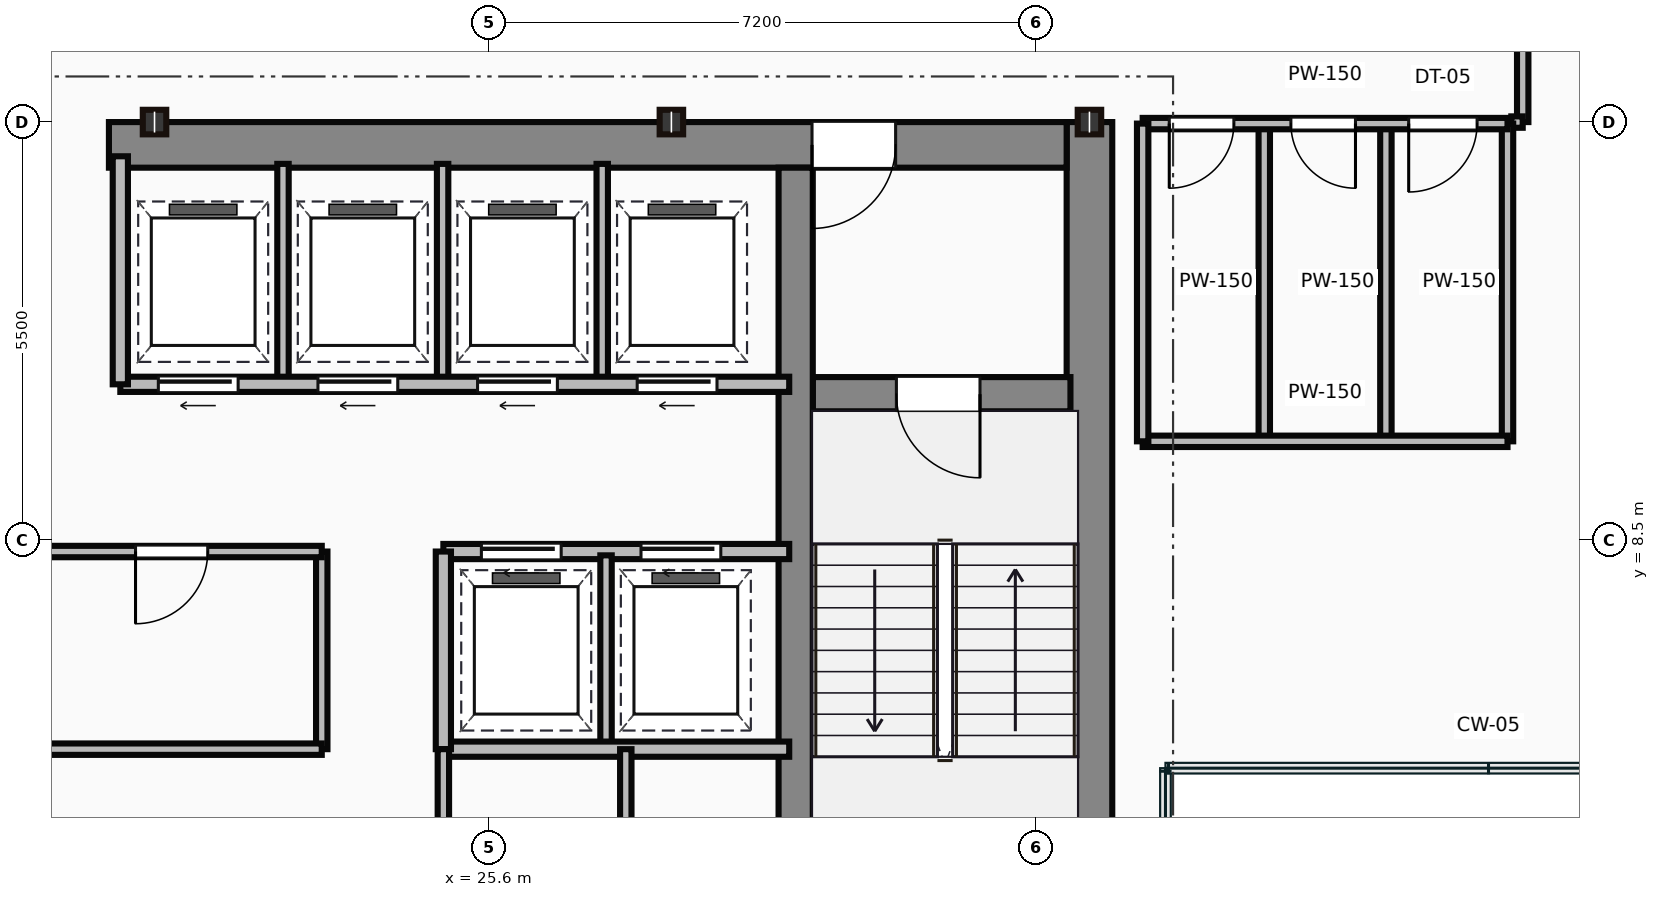
"""IFC4 building model, lengths in metres.
Left out: names, types, materials, properties, quantities, classifications, styles, units other than length and angle.
Written with IfcOpenShell. Run it as: python <this file> out.ifc"""

import sys

from ifc_helpers import new_model, si_unit, direction, frame, frame_2d, origin, origin_2d, place, context, subcontext, project, spatial, rectangle, i_section, extrude, source, transform, mapped, element, fill, save


model = new_model("IFC4")
c1 = context("Model", 3, precision=1e-05, world=origin(), true_north=direction((0.0, 1.0)))
c2 = subcontext(c1, "Body", "Model", "MODEL_VIEW")
j1 = project(units=[si_unit("LENGTHUNIT", "METRE"), si_unit("PLANEANGLEUNIT", "RADIAN")], contexts=[c1])
p1 = place(None, origin())
s1 = spatial("IfcSite", under=j1, at=p1, CompositionType="ELEMENT")
p2 = place(p1, origin())
s2 = spatial("IfcBuilding", under=s1, at=p2, CompositionType="ELEMENT")
p3 = place(p2, frame((0.0, 0.0, 284.35)))
s3 = spatial("IfcBuildingStorey", under=s2, at=p3, CompositionType="ELEMENT", Elevation=284.35)
m1 = source(origin(), c2, "Body", "SweptSolid", [
    extrude(rectangle(XDim=13.1, YDim=0.6, at=frame_2d((6.55, 0.0))), origin(), (0.0, 0.0, 1.0), 3.65),
])
p4 = place(p3, frame((33.5, 0.9, 0.0), z_axis=(0.0, 0.0, 1.0), x_axis=(0.0, 1.0, 0.0)))
e1 = element("IfcWall", 1, at=p4, inside=s3, PredefinedType="SHEAR", context=c2, shape_type="MappedRepresentation", body=[
    mapped(m1, transform((0.0, 0.0, 0.0))),
])
m2 = source(origin(), c2, "Body", "SweptSolid", [
    extrude(rectangle(XDim=12.6, YDim=0.6, at=frame_2d((6.3, 0.0))), origin(), (0.0, 0.0, 1.0), 3.65),
])
p5 = place(p3, frame((20.6, 13.7, 0.0), z_axis=(0.0, 0.0, 1.0), x_axis=(1.0, 0.0, 0.0)))
e2 = element("IfcWall", 2, at=p5, inside=s3, PredefinedType="SHEAR", context=c2, shape_type="MappedRepresentation", body=[
    mapped(m2, transform((0.0, 0.0, 0.0))),
])
p6 = place(p5, frame((9.25, 0.0, 0.0)))
e3 = element("IfcOpeningElement", 3, at=p6, cuts=e2, PredefinedType="OPENING", context=c2, shape_type="SweptSolid", body=[
    extrude(rectangle(XDim=1.1, YDim=2.15, at=frame_2d((0.55, 1.075))), frame((0.0, 0.31, 0.0), z_axis=(0.0, -1.0, 0.0), x_axis=(1.0, 0.0, 0.0)), (0.0, 0.0, 1.0), 0.62),
])
m3 = source(origin(), c2, "Body", "SweptSolid", [
    extrude(rectangle(XDim=12.5, YDim=0.45, at=frame_2d((6.25, 0.0))), origin(), (0.0, 0.0, 1.0), 3.65),
])
p7 = place(p3, frame((29.635, 0.9, 0.0), z_axis=(0.0, 0.0, 1.0), x_axis=(0.0, 1.0, 0.0)))
e4 = element("IfcWall", 4, at=p7, inside=s3, PredefinedType="SHEAR", context=c2, shape_type="MappedRepresentation", body=[
    mapped(m3, transform((0.0, 0.0, 0.0))),
])
m4 = source(origin(), c2, "Body", "SweptSolid", [
    extrude(rectangle(XDim=3.39, YDim=0.45, at=frame_2d((1.695, 0.0))), origin(), (0.0, 0.0, 1.0), 3.65),
])
p8 = place(p3, frame((29.86, 10.42, 0.0), z_axis=(0.0, 0.0, 1.0), x_axis=(1.0, 0.0, 0.0)))
e5 = element("IfcWall", 5, at=p8, inside=s3, PredefinedType="SHEAR", context=c2, shape_type="MappedRepresentation", body=[
    mapped(m4, transform((0.0, 0.0, 0.0))),
])
p9 = place(p8, frame((1.1, 0.0, 0.0)))
e6 = element("IfcOpeningElement", 6, at=p9, cuts=e5, PredefinedType="OPENING", context=c2, shape_type="SweptSolid", body=[
    extrude(rectangle(XDim=1.1, YDim=2.15, at=frame_2d((0.55, 1.075))), frame((0.0, 0.235, 0.0), z_axis=(0.0, -1.0, 0.0), x_axis=(1.0, 0.0, 0.0)), (0.0, 0.0, 1.0), 0.47),
])
m5 = source(origin(), c2, "Body", "SweptSolid", [
    extrude(i_section(OverallWidth=0.309, OverallDepth=0.323, WebThickness=0.014, FlangeThickness=0.023, at=origin_2d()), origin(), (0.0, 0.0, 1.0), 3.65),
])
for number, where, z_axis, x_axis in (
    (7, (21.2, 14.0, 0.0), (0.0, 0.0, 1.0), (1.0, 0.0, 0.0)),
    (8, (28.0, 14.0, 0.0), (0.0, 0.0, 1.0), (1.0, 0.0, 0.0)),
    (9, (33.5, 14.0, 0.0), (0.0, 0.0, 1.0), (1.0, 0.0, 0.0)),
):
    element("IfcColumn", number, at=place(p3, frame(where, z_axis=z_axis, x_axis=x_axis)), inside=s3, PredefinedType="COLUMN", context=c2, shape_type="MappedRepresentation", body=[
        mapped(m5, transform((0.0, 0.0, 0.0))),
    ])
m6 = source(origin(), c2, "Body", "SweptSolid", [
    extrude(rectangle(XDim=11.85, YDim=0.15, at=frame_2d((5.925, 0.0))), origin(), (0.0, 0.0, 1.0), 3.4),
])
p10 = place(p3, frame((11.55, 5.75, 0.0), z_axis=(0.0, 0.0, 1.0), x_axis=(1.0, 0.0, 0.0)))
e10 = element("IfcWall", 10, at=p10, inside=s3, PredefinedType="PARTITIONING", context=c2, shape_type="MappedRepresentation", body=[
    mapped(m6, transform((0.0, 0.0, 0.0))),
])
p11 = place(p3, frame((11.55, 8.35, 0.0), z_axis=(0.0, 0.0, 1.0), x_axis=(1.0, 0.0, 0.0)))
e11 = element("IfcWall", 11, at=p11, inside=s3, PredefinedType="PARTITIONING", context=c2, shape_type="MappedRepresentation", body=[
    mapped(m6, transform((0.0, 0.0, 0.0))),
])
p12 = place(p11, frame((1.1, 0.0, 0.0)))
e12 = element("IfcOpeningElement", 12, at=p12, cuts=e11, PredefinedType="OPENING", context=c2, shape_type="SweptSolid", body=[
    extrude(rectangle(XDim=0.95, YDim=2.15, at=frame_2d((0.475, 1.075))), frame((0.0, 0.085, 0.0), z_axis=(0.0, -1.0, 0.0), x_axis=(1.0, 0.0, 0.0)), (0.0, 0.0, 1.0), 0.17),
])
p13 = place(p11, frame((9.4, 0.0, 0.0)))
e13 = element("IfcOpeningElement", 13, at=p13, cuts=e11, PredefinedType="OPENING", context=c2, shape_type="SweptSolid", body=[
    extrude(rectangle(XDim=0.95, YDim=2.15, at=frame_2d((0.475, 1.075))), frame((0.0, 0.085, 0.0), z_axis=(0.0, -1.0, 0.0), x_axis=(1.0, 0.0, 0.0)), (0.0, 0.0, 1.0), 0.17),
])
m7 = source(origin(), c2, "Body", "SweptSolid", [
    extrude(rectangle(XDim=2.6, YDim=0.15, at=frame_2d((1.3, 0.0))), origin(), (0.0, 0.0, 1.0), 3.4),
])
p14 = place(p3, frame((23.4, 5.75, 0.0), z_axis=(0.0, 0.0, 1.0), x_axis=(0.0, 1.0, 0.0)))
e14 = element("IfcWall", 14, at=p14, inside=s3, PredefinedType="PARTITIONING", context=c2, shape_type="MappedRepresentation", body=[
    mapped(m7, transform((0.0, 0.0, 0.0))),
])
m8 = source(origin(), c2, "Body", "SweptSolid", [
    extrude(rectangle(XDim=8.8, YDim=0.2, at=frame_2d((4.4, 0.0))), origin(), (0.0, 0.0, 1.0), 3.4),
])
p15 = place(p3, frame((20.75, 10.55, 0.0), z_axis=(0.0, 0.0, 1.0), x_axis=(1.0, 0.0, 0.0)))
e15 = element("IfcWall", 15, at=p15, inside=s3, PredefinedType="PARTITIONING", context=c2, shape_type="MappedRepresentation", body=[
    mapped(m8, transform((0.0, 0.0, 0.0))),
])
p16 = place(p15, frame((0.5, 0.0, 0.0)))
e16 = element("IfcOpeningElement", 16, at=p16, cuts=e15, PredefinedType="OPENING", context=c2, shape_type="SweptSolid", body=[
    extrude(rectangle(XDim=1.05, YDim=2.15, at=frame_2d((0.525, 1.075))), frame((0.0, 0.11, 0.0), z_axis=(0.0, -1.0, 0.0), x_axis=(1.0, 0.0, 0.0)), (0.0, 0.0, 1.0), 0.22),
])
p17 = place(p15, frame((2.6, 0.0, 0.0)))
e17 = element("IfcOpeningElement", 17, at=p17, cuts=e15, PredefinedType="OPENING", context=c2, shape_type="SweptSolid", body=[
    extrude(rectangle(XDim=1.05, YDim=2.15, at=frame_2d((0.525, 1.075))), frame((0.0, 0.11, 0.0), z_axis=(0.0, -1.0, 0.0), x_axis=(1.0, 0.0, 0.0)), (0.0, 0.0, 1.0), 0.22),
])
p18 = place(p15, frame((4.7, 0.0, 0.0)))
e18 = element("IfcOpeningElement", 18, at=p18, cuts=e15, PredefinedType="OPENING", context=c2, shape_type="SweptSolid", body=[
    extrude(rectangle(XDim=1.05, YDim=2.15, at=frame_2d((0.525, 1.075))), frame((0.0, 0.11, 0.0), z_axis=(0.0, -1.0, 0.0), x_axis=(1.0, 0.0, 0.0)), (0.0, 0.0, 1.0), 0.22),
])
p19 = place(p15, frame((6.8, 0.0, 0.0)))
e19 = element("IfcOpeningElement", 19, at=p19, cuts=e15, PredefinedType="OPENING", context=c2, shape_type="SweptSolid", body=[
    extrude(rectangle(XDim=1.05, YDim=2.15, at=frame_2d((0.525, 1.075))), frame((0.0, 0.11, 0.0), z_axis=(0.0, -1.0, 0.0), x_axis=(1.0, 0.0, 0.0)), (0.0, 0.0, 1.0), 0.22),
])
m9 = source(origin(), c2, "Body", "SweptSolid", [
    extrude(rectangle(XDim=3.0, YDim=0.2, at=frame_2d((1.5, 0.0))), origin(), (0.0, 0.0, 1.0), 3.4),
])
p20 = place(p3, frame((20.75, 10.55, 0.0), z_axis=(0.0, 0.0, 1.0), x_axis=(0.0, 1.0, 0.0)))
e20 = element("IfcWall", 20, at=p20, inside=s3, PredefinedType="PARTITIONING", context=c2, shape_type="MappedRepresentation", body=[
    mapped(m9, transform((0.0, 0.0, 0.0))),
])
m10 = source(origin(), c2, "Body", "SweptSolid", [
    extrude(rectangle(XDim=2.85, YDim=0.15, at=frame_2d((1.425, 0.0))), origin(), (0.0, 0.0, 1.0), 3.4),
])
for number, where, z_axis, x_axis in (
    (21, (22.89, 10.6, 0.0), (0.0, 0.0, 1.0), (0.0, 1.0, 0.0)),
    (22, (24.99, 10.6, 0.0), (0.0, 0.0, 1.0), (0.0, 1.0, 0.0)),
    (23, (27.09, 10.6, 0.0), (0.0, 0.0, 1.0), (0.0, 1.0, 0.0)),
):
    element("IfcWall", number, at=place(p3, frame(where, z_axis=z_axis, x_axis=x_axis)), inside=s3, PredefinedType="PARTITIONING", context=c2, shape_type="MappedRepresentation", body=[
        mapped(m10, transform((0.0, 0.0, 0.0))),
    ])
m11 = source(origin(), c2, "Body", "SweptSolid", [
    extrude(rectangle(XDim=4.55, YDim=0.2, at=frame_2d((2.275, 0.0))), origin(), (0.0, 0.0, 1.0), 3.4),
])
p21 = place(p3, frame((25.0, 8.35, 0.0), z_axis=(0.0, 0.0, 1.0), x_axis=(1.0, 0.0, 0.0)))
e24 = element("IfcWall", 24, at=p21, inside=s3, PredefinedType="PARTITIONING", context=c2, shape_type="MappedRepresentation", body=[
    mapped(m11, transform((0.0, 0.0, 0.0))),
])
p22 = place(p21, frame((0.5, 0.0, 0.0)))
e25 = element("IfcOpeningElement", 25, at=p22, cuts=e24, PredefinedType="OPENING", context=c2, shape_type="SweptSolid", body=[
    extrude(rectangle(XDim=1.05, YDim=2.15, at=frame_2d((0.525, 1.075))), frame((0.0, 0.11, 0.0), z_axis=(0.0, -1.0, 0.0), x_axis=(1.0, 0.0, 0.0)), (0.0, 0.0, 1.0), 0.22),
])
p23 = place(p21, frame((2.6, 0.0, 0.0)))
e26 = element("IfcOpeningElement", 26, at=p23, cuts=e24, PredefinedType="OPENING", context=c2, shape_type="SweptSolid", body=[
    extrude(rectangle(XDim=1.05, YDim=2.15, at=frame_2d((0.525, 1.075))), frame((0.0, 0.11, 0.0), z_axis=(0.0, -1.0, 0.0), x_axis=(1.0, 0.0, 0.0)), (0.0, 0.0, 1.0), 0.22),
])
p24 = place(p3, frame((25.0, 5.75, 0.0), z_axis=(0.0, 0.0, 1.0), x_axis=(1.0, 0.0, 0.0)))
e27 = element("IfcWall", 27, at=p24, inside=s3, PredefinedType="PARTITIONING", context=c2, shape_type="MappedRepresentation", body=[
    mapped(m11, transform((0.0, 0.0, 0.0))),
])
m12 = source(origin(), c2, "Body", "SweptSolid", [
    extrude(rectangle(XDim=2.6, YDim=0.2, at=frame_2d((1.3, 0.0))), origin(), (0.0, 0.0, 1.0), 3.4),
])
p25 = place(p3, frame((25.0, 5.75, 0.0), z_axis=(0.0, 0.0, 1.0), x_axis=(0.0, 1.0, 0.0)))
e28 = element("IfcWall", 28, at=p25, inside=s3, PredefinedType="PARTITIONING", context=c2, shape_type="MappedRepresentation", body=[
    mapped(m12, transform((0.0, 0.0, 0.0))),
])
m13 = source(origin(), c2, "Body", "SweptSolid", [
    extrude(rectangle(XDim=2.5, YDim=0.15, at=frame_2d((1.25, 0.0))), origin(), (0.0, 0.0, 1.0), 3.4),
])
p26 = place(p3, frame((27.14, 5.8, 0.0), z_axis=(0.0, 0.0, 1.0), x_axis=(0.0, 1.0, 0.0)))
e29 = element("IfcWall", 29, at=p26, inside=s3, PredefinedType="PARTITIONING", context=c2, shape_type="MappedRepresentation", body=[
    mapped(m13, transform((0.0, 0.0, 0.0))),
])
m14 = source(origin(), c2, "Body", "SweptSolid", [
    extrude(rectangle(XDim=4.9, YDim=0.15, at=frame_2d((2.45, 0.0))), origin(), (0.0, 0.0, 1.0), 3.4),
])
p27 = place(p3, frame((25.0, 0.85, 0.0), z_axis=(0.0, 0.0, 1.0), x_axis=(0.0, 1.0, 0.0)))
e30 = element("IfcWall", 30, at=p27, inside=s3, PredefinedType="PARTITIONING", context=c2, shape_type="MappedRepresentation", body=[
    mapped(m14, transform((0.0, 0.0, 0.0))),
])
p28 = place(p27, frame((2.5, 0.0, 0.0)))
e31 = element("IfcOpeningElement", 31, at=p28, cuts=e30, PredefinedType="OPENING", context=c2, shape_type="SweptSolid", body=[
    extrude(rectangle(XDim=0.95, YDim=2.15, at=frame_2d((0.475, 1.075))), frame((0.0, 0.085, 0.0), z_axis=(0.0, -1.0, 0.0), x_axis=(1.0, 0.0, 0.0)), (0.0, 0.0, 1.0), 0.17),
])
m15 = source(origin(), c2, "Body", "SweptSolid", [
    extrude(rectangle(XDim=3.4, YDim=0.15, at=frame_2d((1.7, 0.0))), origin(), (0.0, 0.0, 1.0), 3.4),
])
p29 = place(p3, frame((27.4, 2.35, 0.0), z_axis=(0.0, 0.0, 1.0), x_axis=(0.0, 1.0, 0.0)))
e32 = element("IfcWall", 32, at=p29, inside=s3, PredefinedType="PARTITIONING", context=c2, shape_type="MappedRepresentation", body=[
    mapped(m15, transform((0.0, 0.0, 0.0))),
])
p30 = place(p29, frame((1.1, 0.0, 0.0)))
e33 = element("IfcOpeningElement", 33, at=p30, cuts=e32, PredefinedType="OPENING", context=c2, shape_type="SweptSolid", body=[
    extrude(rectangle(XDim=0.85, YDim=2.1, at=frame_2d((0.425, 1.05))), frame((0.0, 0.085, 0.0), z_axis=(0.0, -1.0, 0.0), x_axis=(1.0, 0.0, 0.0)), (0.0, 0.0, 1.0), 0.17),
])
m16 = source(origin(), c2, "Body", "SweptSolid", [
    extrude(rectangle(XDim=4.8, YDim=0.15, at=frame_2d((2.4, 0.0))), origin(), (0.0, 0.0, 1.0), 2.787),
])
p31 = place(p3, frame((34.2, 13.98, 0.0), z_axis=(0.0, 0.0, 1.0), x_axis=(1.0, 0.0, 0.0)))
e34 = element("IfcWall", 34, at=p31, inside=s3, PredefinedType="PARTITIONING", context=c2, shape_type="MappedRepresentation", body=[
    mapped(m16, transform((0.0, 0.0, 0.0))),
])
p32 = place(p31, frame((0.35, 0.0, 0.0)))
e35 = element("IfcOpeningElement", 35, at=p32, cuts=e34, PredefinedType="OPENING", context=c2, shape_type="SweptSolid", body=[
    extrude(rectangle(XDim=0.85, YDim=2.1, at=frame_2d((0.425, 1.05))), frame((0.0, 0.085, 0.0), z_axis=(0.0, -1.0, 0.0), x_axis=(1.0, 0.0, 0.0)), (0.0, 0.0, 1.0), 0.17),
])
p33 = place(p31, frame((1.95, 0.0, 0.0)))
e36 = element("IfcOpeningElement", 36, at=p33, cuts=e34, PredefinedType="OPENING", context=c2, shape_type="SweptSolid", body=[
    extrude(rectangle(XDim=0.85, YDim=2.1, at=frame_2d((0.425, 1.05))), frame((0.0, 0.085, 0.0), z_axis=(0.0, -1.0, 0.0), x_axis=(1.0, 0.0, 0.0)), (0.0, 0.0, 1.0), 0.17),
])
p34 = place(p31, frame((3.5, 0.0, 0.0)))
e37 = element("IfcOpeningElement", 37, at=p34, cuts=e34, PredefinedType="OPENING", context=c2, shape_type="SweptSolid", body=[
    extrude(rectangle(XDim=0.9, YDim=2.1, at=frame_2d((0.45, 1.05))), frame((0.0, 0.085, 0.0), z_axis=(0.0, -1.0, 0.0), x_axis=(1.0, 0.0, 0.0)), (0.0, 0.0, 1.0), 0.17),
])
m17 = source(origin(), c2, "Body", "SweptSolid", [
    extrude(rectangle(XDim=4.8, YDim=0.15, at=frame_2d((2.4, 0.0))), origin(), (0.0, 0.0, 1.0), 3.4),
])
p35 = place(p3, frame((34.2, 9.8, 0.0), z_axis=(0.0, 0.0, 1.0), x_axis=(1.0, 0.0, 0.0)))
e38 = element("IfcWall", 38, at=p35, inside=s3, PredefinedType="PARTITIONING", context=c2, shape_type="MappedRepresentation", body=[
    mapped(m17, transform((0.0, 0.0, 0.0))),
])
m18 = source(origin(), c2, "Body", "SweptSolid", [
    extrude(rectangle(XDim=4.18, YDim=0.15, at=frame_2d((2.09, 0.0))), origin(), (0.0, 0.0, 1.0), 3.4),
])
for number, where, z_axis, x_axis in (
    (39, (39.0, 9.8, 0.0), (0.0, 0.0, 1.0), (0.0, 1.0, 0.0)),
    (40, (34.2, 9.8, 0.0), (0.0, 0.0, 1.0), (0.0, 1.0, 0.0)),
    (41, (35.8, 9.8, 0.0), (0.0, 0.0, 1.0), (0.0, 1.0, 0.0)),
    (42, (37.4, 9.8, 0.0), (0.0, 0.0, 1.0), (0.0, 1.0, 0.0)),
):
    element("IfcWall", number, at=place(p3, frame(where, z_axis=z_axis, x_axis=x_axis)), inside=s3, PredefinedType="PARTITIONING", context=c2, shape_type="MappedRepresentation", body=[
        mapped(m18, transform((0.0, 0.0, 0.0))),
    ])
m19 = source(origin(), c2, "Body", "SweptSolid", [
    extrude(rectangle(XDim=2.2, YDim=0.15, at=frame_2d((1.1, 0.0))), origin(), (0.0, 0.0, 1.0), 3.4),
])
p36 = place(p3, frame((39.2, 16.2, 0.0), z_axis=(0.0, 0.0, 1.0), x_axis=(0.0, -1.0, 0.0)))
e43 = element("IfcWall", 43, at=p36, inside=s3, PredefinedType="PARTITIONING", context=c2, shape_type="MappedRepresentation", body=[
    mapped(m19, transform((0.0, 0.0, 0.0))),
])
m20 = source(origin(), c2, "Body", "SweptSolid", [
    extrude(rectangle(XDim=0.15, YDim=0.15, at=frame_2d((0.075, 0.0))), origin(), (0.0, 0.0, 1.0), 3.4),
])
p37 = place(p3, frame((39.2, 14.0, 0.0), z_axis=(0.0, 0.0, 1.0), x_axis=(-1.0, 0.0, 0.0)))
e44 = element("IfcWall", 44, at=p37, inside=s3, PredefinedType="PARTITIONING", context=c2, shape_type="MappedRepresentation", body=[
    mapped(m20, transform((0.0, 0.0, 0.0))),
])
m21 = source(origin(), c2, "Body", "SweptSolid", [
    extrude(rectangle(XDim=1.1, YDim=2.15, at=frame_2d((0.55, 1.075))), frame((0.0, 0.025, 0.0), z_axis=(0.0, -1.0, 0.0), x_axis=(1.0, 0.0, 0.0)), (0.0, 0.0, 1.0), 0.05),
])
p38 = place(p9, frame((1.1, 0.0, 0.0), z_axis=(0.0, 0.0, 1.0), x_axis=(-1.0, 0.0, 0.0)))
e45 = element("IfcDoor", 45, at=p38, inside=s3, OperationType="SINGLE_SWING_RIGHT", PredefinedType="DOOR", context=c2, shape_type="MappedRepresentation", body=[
    mapped(m21, transform((0.0, 0.0, 0.0))),
])
fill(e6, e45)
p39 = place(p6, origin())
e46 = element("IfcDoor", 46, at=p39, inside=s3, OperationType="SINGLE_SWING_LEFT", PredefinedType="DOOR", context=c2, shape_type="MappedRepresentation", body=[
    mapped(m21, transform((0.0, 0.0, 0.0))),
])
fill(e3, e46)
m22 = source(origin(), c2, "Body", "SweptSolid", [
    extrude(rectangle(XDim=0.95, YDim=2.15, at=frame_2d((0.475, 1.075))), frame((0.0, 0.025, 0.0), z_axis=(0.0, -1.0, 0.0), x_axis=(1.0, 0.0, 0.0)), (0.0, 0.0, 1.0), 0.05),
])
p40 = place(p13, origin())
e47 = element("IfcDoor", 47, at=p40, inside=s3, OperationType="SINGLE_SWING_LEFT", PredefinedType="DOOR", context=c2, shape_type="MappedRepresentation", body=[
    mapped(m22, transform((0.0, 0.0, 0.0))),
])
fill(e13, e47)
m23 = source(origin(), c2, "Body", "SweptSolid", [
    extrude(rectangle(XDim=1.05, YDim=2.15, at=frame_2d((0.525, 1.075))), frame((0.0, 0.025, 0.0), z_axis=(0.0, -1.0, 0.0), x_axis=(1.0, 0.0, 0.0)), (0.0, 0.0, 1.0), 0.05),
])
p41 = place(p16, frame((1.05, 0.0, 0.0), z_axis=(0.0, 0.0, 1.0), x_axis=(-1.0, 0.0, 0.0)))
e48 = element("IfcDoor", 48, at=p41, inside=s3, OperationType="SLIDING_TO_LEFT", PredefinedType="DOOR", context=c2, shape_type="MappedRepresentation", body=[
    mapped(m23, transform((0.0, 0.0, 0.0))),
])
fill(e16, e48)
p42 = place(p17, frame((1.05, 0.0, 0.0), z_axis=(0.0, 0.0, 1.0), x_axis=(-1.0, 0.0, 0.0)))
e49 = element("IfcDoor", 49, at=p42, inside=s3, OperationType="SLIDING_TO_LEFT", PredefinedType="DOOR", context=c2, shape_type="MappedRepresentation", body=[
    mapped(m23, transform((0.0, 0.0, 0.0))),
])
fill(e17, e49)
p43 = place(p18, frame((1.05, 0.0, 0.0), z_axis=(0.0, 0.0, 1.0), x_axis=(-1.0, 0.0, 0.0)))
e50 = element("IfcDoor", 50, at=p43, inside=s3, OperationType="SLIDING_TO_LEFT", PredefinedType="DOOR", context=c2, shape_type="MappedRepresentation", body=[
    mapped(m23, transform((0.0, 0.0, 0.0))),
])
fill(e18, e50)
p44 = place(p19, frame((1.05, 0.0, 0.0), z_axis=(0.0, 0.0, 1.0), x_axis=(-1.0, 0.0, 0.0)))
e51 = element("IfcDoor", 51, at=p44, inside=s3, OperationType="SLIDING_TO_LEFT", PredefinedType="DOOR", context=c2, shape_type="MappedRepresentation", body=[
    mapped(m23, transform((0.0, 0.0, 0.0))),
])
fill(e19, e51)
p45 = place(p22, origin())
e52 = element("IfcDoor", 52, at=p45, inside=s3, OperationType="SLIDING_TO_LEFT", PredefinedType="DOOR", context=c2, shape_type="MappedRepresentation", body=[
    mapped(m23, transform((0.0, 0.0, 0.0))),
])
fill(e25, e52)
p46 = place(p23, origin())
e53 = element("IfcDoor", 53, at=p46, inside=s3, OperationType="SLIDING_TO_LEFT", PredefinedType="DOOR", context=c2, shape_type="MappedRepresentation", body=[
    mapped(m23, transform((0.0, 0.0, 0.0))),
])
fill(e26, e53)
m24 = source(origin(), c2, "Body", "SweptSolid", [
    extrude(rectangle(XDim=0.85, YDim=2.1, at=frame_2d((0.425, 1.05))), frame((0.0, 0.025, 0.0), z_axis=(0.0, -1.0, 0.0), x_axis=(1.0, 0.0, 0.0)), (0.0, 0.0, 1.0), 0.05),
])
p47 = place(p32, frame((0.85, 0.0, 0.0), z_axis=(0.0, 0.0, 1.0), x_axis=(-1.0, 0.0, 0.0)))
e54 = element("IfcDoor", 54, at=p47, inside=s3, OperationType="SINGLE_SWING_LEFT", PredefinedType="DOOR", context=c2, shape_type="MappedRepresentation", body=[
    mapped(m24, transform((0.0, 0.0, 0.0))),
])
fill(e35, e54)
p48 = place(p33, frame((0.85, 0.0, 0.0), z_axis=(0.0, 0.0, 1.0), x_axis=(-1.0, 0.0, 0.0)))
e55 = element("IfcDoor", 55, at=p48, inside=s3, OperationType="SINGLE_SWING_RIGHT", PredefinedType="DOOR", context=c2, shape_type="MappedRepresentation", body=[
    mapped(m24, transform((0.0, 0.0, 0.0))),
])
fill(e36, e55)
m25 = source(origin(), c2, "Body", "SweptSolid", [
    extrude(rectangle(XDim=0.9, YDim=2.1, at=frame_2d((0.45, 1.05))), frame((0.0, 0.025, 0.0), z_axis=(0.0, -1.0, 0.0), x_axis=(1.0, 0.0, 0.0)), (0.0, 0.0, 1.0), 0.05),
])
p49 = place(p34, frame((0.9, 0.0, 0.0), z_axis=(0.0, 0.0, 1.0), x_axis=(-1.0, 0.0, 0.0)))
e56 = element("IfcDoor", 56, at=p49, inside=s3, OperationType="SINGLE_SWING_LEFT", PredefinedType="DOOR", context=c2, shape_type="MappedRepresentation", body=[
    mapped(m25, transform((0.0, 0.0, 0.0))),
])
fill(e37, e56)
save(model, sys.argv[1])
